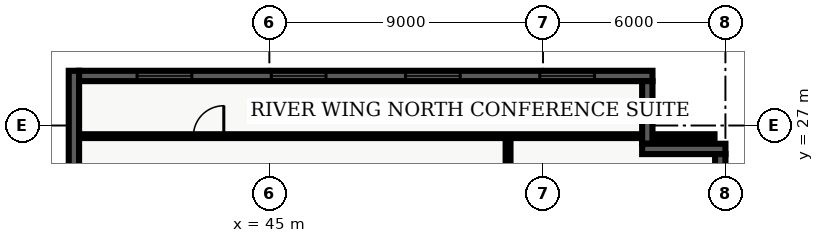
"""IFC4 building model, lengths in metres.
Left out: names, types, materials, properties, quantities, classifications, styles, units other than length and angle.
Written with IfcOpenShell. Run it as: python <this file> out.ifc"""

import sys

from ifc_helpers import new_model, entity, si_unit, converted_unit, direction, frame, origin_with_axes, origin_2d_with_axis, place, context, subcontext, project, spatial, polyline, rectangle, outline, extrude, element, fill, save


model = new_model("IFC4")
c1 = context("Model", 3, precision=1e-05, world=origin_with_axes(), true_north=direction((0.0, 1.0)))
c2 = subcontext(c1, "Body", "Model", "MODEL_VIEW")
j1 = project(units=[si_unit("LENGTHUNIT", "METRE"), converted_unit("PLANEANGLEUNIT", "DEGREE", entity("IfcPlaneAngleMeasure", 0.017), si_unit("PLANEANGLEUNIT", "RADIAN"), dimensions=[0, 0, 0, 0, 0, 0, 0])], contexts=[c1])
p1 = place(None, origin_with_axes())
s1 = spatial("IfcSite", under=j1, at=p1, CompositionType="ELEMENT")
p2 = place(p1, origin_with_axes())
s2 = spatial("IfcBuilding", under=s1, at=p2, CompositionType="ELEMENT")
p3 = place(p2, frame((0.0, 0.0, 140.7), z_axis=(0.0, 0.0, 1.0), x_axis=(1.0, 0.0, 0.0)))
s3 = spatial("IfcBuildingStorey", under=s2, at=p3, CompositionType="ELEMENT", Elevation=140.7)
p4 = place(p3, frame((52.85, 7.85, 0.0), z_axis=(0.0, 0.0, 1.0), x_axis=(0.0, 1.0, 0.0)))
e1 = element("IfcWall", 1, at=p4, inside=s3, PredefinedType="PARTITIONING", context=c2, shape_type="SweptSolid", body=[
    extrude(outline(polyline([(0.0, -0.08), (18.8, -0.08), (18.8, 0.08), (0.0, 0.08), (0.0, -0.08)])), origin_with_axes(), (0.0, 0.0, 1.0), 2.7),
])
p5 = place(p4, frame((4.133, 0.0, 0.0), z_axis=(0.0, 0.0, 1.0), x_axis=(1.0, 0.0, 0.0)))
e2 = element("IfcOpeningElement", 2, at=p5, cuts=e1, PredefinedType="OPENING", context=c2, shape_type="SweptSolid", body=[
    extrude(rectangle(XDim=1.0, YDim=0.18, at=origin_2d_with_axis()), origin_with_axes(), (0.0, 0.0, 1.0), 2.15),
])
p6 = place(p4, frame((13.473, 0.0, 0.0), z_axis=(0.0, 0.0, 1.0), x_axis=(1.0, 0.0, 0.0)))
e3 = element("IfcOpeningElement", 3, at=p6, cuts=e1, PredefinedType="OPENING", context=c2, shape_type="SweptSolid", body=[
    extrude(rectangle(XDim=1.0, YDim=0.18, at=origin_2d_with_axis()), origin_with_axes(), (0.0, 0.0, 1.0), 2.15),
])
p7 = place(p3, frame((38.735, 26.65, 0.0), z_axis=(0.0, 0.0, 1.0), x_axis=(1.0, 0.0, 0.0)))
e4 = element("IfcWall", 4, at=p7, inside=s3, PredefinedType="PARTITIONING", context=c2, shape_type="SweptSolid", body=[
    extrude(outline(polyline([(0.0, -0.062), (20.905, -0.062), (20.905, 0.062), (0.0, 0.062), (0.0, -0.062)])), origin_with_axes(), (0.0, 0.0, 1.0), 2.7),
])
p8 = place(p7, frame((4.265, 0.0, 0.0), z_axis=(0.0, 0.0, 1.0), x_axis=(1.0, 0.0, 0.0)))
e5 = element("IfcOpeningElement", 5, at=p8, cuts=e4, PredefinedType="OPENING", context=c2, shape_type="SweptSolid", body=[
    extrude(rectangle(XDim=1.0, YDim=0.145, at=origin_2d_with_axis()), origin_with_axes(), (0.0, 0.0, 1.0), 2.15),
])
p9 = place(p3, frame((38.57, 21.26, 0.0), z_axis=(0.0, 0.0, 1.0), x_axis=(0.0, 1.0, 0.0)))
e6 = element("IfcWall", 6, at=p9, inside=s3, PredefinedType="SOLIDWALL", context=c2, shape_type="SweptSolid", body=[
    extrude(outline(polyline([(0.0, -0.17), (7.54, -0.17), (7.54, 0.17), (0.0, 0.17), (0.0, -0.17)])), origin_with_axes(), (0.0, 0.0, 1.0), 3.66),
])
p10 = place(p3, frame((38.74, 28.63, 0.0), z_axis=(0.0, 0.0, 1.0), x_axis=(1.0, 0.0, 0.0)))
e7 = element("IfcWall", 7, at=p10, inside=s3, PredefinedType="SOLIDWALL", context=c2, shape_type="SweptSolid", body=[
    extrude(outline(polyline([(0.0, -0.17), (18.86, -0.17), (18.86, 0.17), (0.0, 0.17), (0.0, -0.17)])), origin_with_axes(), (0.0, 0.0, 1.0), 3.66),
])
p11 = place(p10, frame((2.808, 0.0, 0.45), z_axis=(0.0, 0.0, 1.0), x_axis=(1.0, 0.0, 0.0)))
e8 = element("IfcOpeningElement", 8, at=p11, cuts=e7, PredefinedType="OPENING", context=c2, shape_type="SweptSolid", body=[
    extrude(rectangle(XDim=1.8, YDim=0.36, at=origin_2d_with_axis()), origin_with_axes(), (0.0, 0.0, 1.0), 2.1),
])
p12 = place(p10, frame((7.222, 0.0, 0.45), z_axis=(0.0, 0.0, 1.0), x_axis=(1.0, 0.0, 0.0)))
e9 = element("IfcOpeningElement", 9, at=p12, cuts=e7, PredefinedType="OPENING", context=c2, shape_type="SweptSolid", body=[
    extrude(rectangle(XDim=1.8, YDim=0.36, at=origin_2d_with_axis()), origin_with_axes(), (0.0, 0.0, 1.0), 2.1),
])
p13 = place(p10, frame((11.637, 0.0, 0.45), z_axis=(0.0, 0.0, 1.0), x_axis=(1.0, 0.0, 0.0)))
e10 = element("IfcOpeningElement", 10, at=p13, cuts=e7, PredefinedType="OPENING", context=c2, shape_type="SweptSolid", body=[
    extrude(rectangle(XDim=1.8, YDim=0.36, at=origin_2d_with_axis()), origin_with_axes(), (0.0, 0.0, 1.0), 2.1),
])
p14 = place(p10, frame((16.053, 0.0, 0.45), z_axis=(0.0, 0.0, 1.0), x_axis=(1.0, 0.0, 0.0)))
e11 = element("IfcOpeningElement", 11, at=p14, cuts=e7, PredefinedType="OPENING", context=c2, shape_type="SweptSolid", body=[
    extrude(rectangle(XDim=1.8, YDim=0.36, at=origin_2d_with_axis()), origin_with_axes(), (0.0, 0.0, 1.0), 2.1),
])
p15 = place(p3, frame((57.43, 28.46, 0.0), z_axis=(0.0, 0.0, 1.0), x_axis=(0.0, -1.0, 0.0)))
e12 = element("IfcWall", 12, at=p15, inside=s3, PredefinedType="SOLIDWALL", context=c2, shape_type="SweptSolid", body=[
    extrude(outline(polyline([(0.0, -0.17), (2.06, -0.17), (2.06, 0.17), (0.0, 0.17), (0.0, -0.17)])), origin_with_axes(), (0.0, 0.0, 1.0), 3.66),
])
p16 = place(p3, frame((57.26, 26.23, 0.0), z_axis=(0.0, 0.0, 1.0), x_axis=(1.0, 0.0, 0.0)))
e13 = element("IfcWall", 13, at=p16, inside=s3, PredefinedType="SOLIDWALL", context=c2, shape_type="SweptSolid", body=[
    extrude(outline(polyline([(0.0, -0.17), (2.74, -0.17), (2.74, 0.17), (0.0, 0.17), (0.0, -0.17)])), origin_with_axes(), (0.0, 0.0, 1.0), 3.66),
])
p17 = place(p3, frame((59.83, 26.06, 0.0), z_axis=(0.0, 0.0, 1.0), x_axis=(0.0, -1.0, 0.0)))
e14 = element("IfcWall", 14, at=p17, inside=s3, PredefinedType="SOLIDWALL", context=c2, shape_type="SweptSolid", body=[
    extrude(outline(polyline([(0.0, -0.17), (23.66, -0.17), (23.66, 0.17), (0.0, 0.17), (0.0, -0.17)])), origin_with_axes(), (0.0, 0.0, 1.0), 3.66),
])
p18 = place(p17, frame((3.696, 0.0, 0.45), z_axis=(0.0, 0.0, 1.0), x_axis=(1.0, 0.0, 0.0)))
e15 = element("IfcOpeningElement", 15, at=p18, cuts=e14, PredefinedType="OPENING", context=c2, shape_type="SweptSolid", body=[
    extrude(rectangle(XDim=1.8, YDim=0.36, at=origin_2d_with_axis()), origin_with_axes(), (0.0, 0.0, 1.0), 2.1),
])
p19 = place(p17, frame((11.83, 0.0, 0.45), z_axis=(0.0, 0.0, 1.0), x_axis=(1.0, 0.0, 0.0)))
e16 = element("IfcOpeningElement", 16, at=p19, cuts=e14, PredefinedType="OPENING", context=c2, shape_type="SweptSolid", body=[
    extrude(rectangle(XDim=1.8, YDim=0.36, at=origin_2d_with_axis()), origin_with_axes(), (0.0, 0.0, 1.0), 2.1),
])
p20 = place(p17, frame((20.364, 0.0, 0.45), z_axis=(0.0, 0.0, 1.0), x_axis=(1.0, 0.0, 0.0)))
e17 = element("IfcOpeningElement", 17, at=p20, cuts=e14, PredefinedType="OPENING", context=c2, shape_type="SweptSolid", body=[
    extrude(rectangle(XDim=1.8, YDim=0.36, at=origin_2d_with_axis()), origin_with_axes(), (0.0, 0.0, 1.0), 2.1),
])
p21 = place(p7, frame((4.265, 0.0, 0.0), z_axis=(0.0, 0.0, 1.0), x_axis=(1.0, 0.0, 0.0)))
e18 = element("IfcDoor", 18, at=p21, inside=s3, OperationType="SINGLE_SWING_RIGHT", PredefinedType="DOOR", context=c2, shape_type="SweptSolid", body=[
    extrude(rectangle(XDim=1.0, YDim=0.075, at=origin_2d_with_axis()), origin_with_axes(), (0.0, 0.0, 1.0), 2.15),
])
fill(e5, e18)
p22 = place(p10, frame((2.808, 0.0, 0.45), z_axis=(0.0, 0.0, 1.0), x_axis=(1.0, 0.0, 0.0)))
e19 = element("IfcWindow", 19, at=p22, inside=s3, PredefinedType="WINDOW", context=c2, shape_type="SweptSolid", body=[
    extrude(rectangle(XDim=1.8, YDim=0.09, at=origin_2d_with_axis()), origin_with_axes(), (0.0, 0.0, 1.0), 2.1),
])
fill(e8, e19)
p23 = place(p10, frame((7.222, 0.0, 0.45), z_axis=(0.0, 0.0, 1.0), x_axis=(1.0, 0.0, 0.0)))
e20 = element("IfcWindow", 20, at=p23, inside=s3, PredefinedType="WINDOW", context=c2, shape_type="SweptSolid", body=[
    extrude(rectangle(XDim=1.8, YDim=0.09, at=origin_2d_with_axis()), origin_with_axes(), (0.0, 0.0, 1.0), 2.1),
])
fill(e9, e20)
p24 = place(p10, frame((11.637, 0.0, 0.45), z_axis=(0.0, 0.0, 1.0), x_axis=(1.0, 0.0, 0.0)))
e21 = element("IfcWindow", 21, at=p24, inside=s3, PredefinedType="WINDOW", context=c2, shape_type="SweptSolid", body=[
    extrude(rectangle(XDim=1.8, YDim=0.09, at=origin_2d_with_axis()), origin_with_axes(), (0.0, 0.0, 1.0), 2.1),
])
fill(e10, e21)
p25 = place(p10, frame((16.053, 0.0, 0.45), z_axis=(0.0, 0.0, 1.0), x_axis=(1.0, 0.0, 0.0)))
e22 = element("IfcWindow", 22, at=p25, inside=s3, PredefinedType="WINDOW", context=c2, shape_type="SweptSolid", body=[
    extrude(rectangle(XDim=1.8, YDim=0.09, at=origin_2d_with_axis()), origin_with_axes(), (0.0, 0.0, 1.0), 2.1),
])
fill(e11, e22)
save(model, sys.argv[1])
